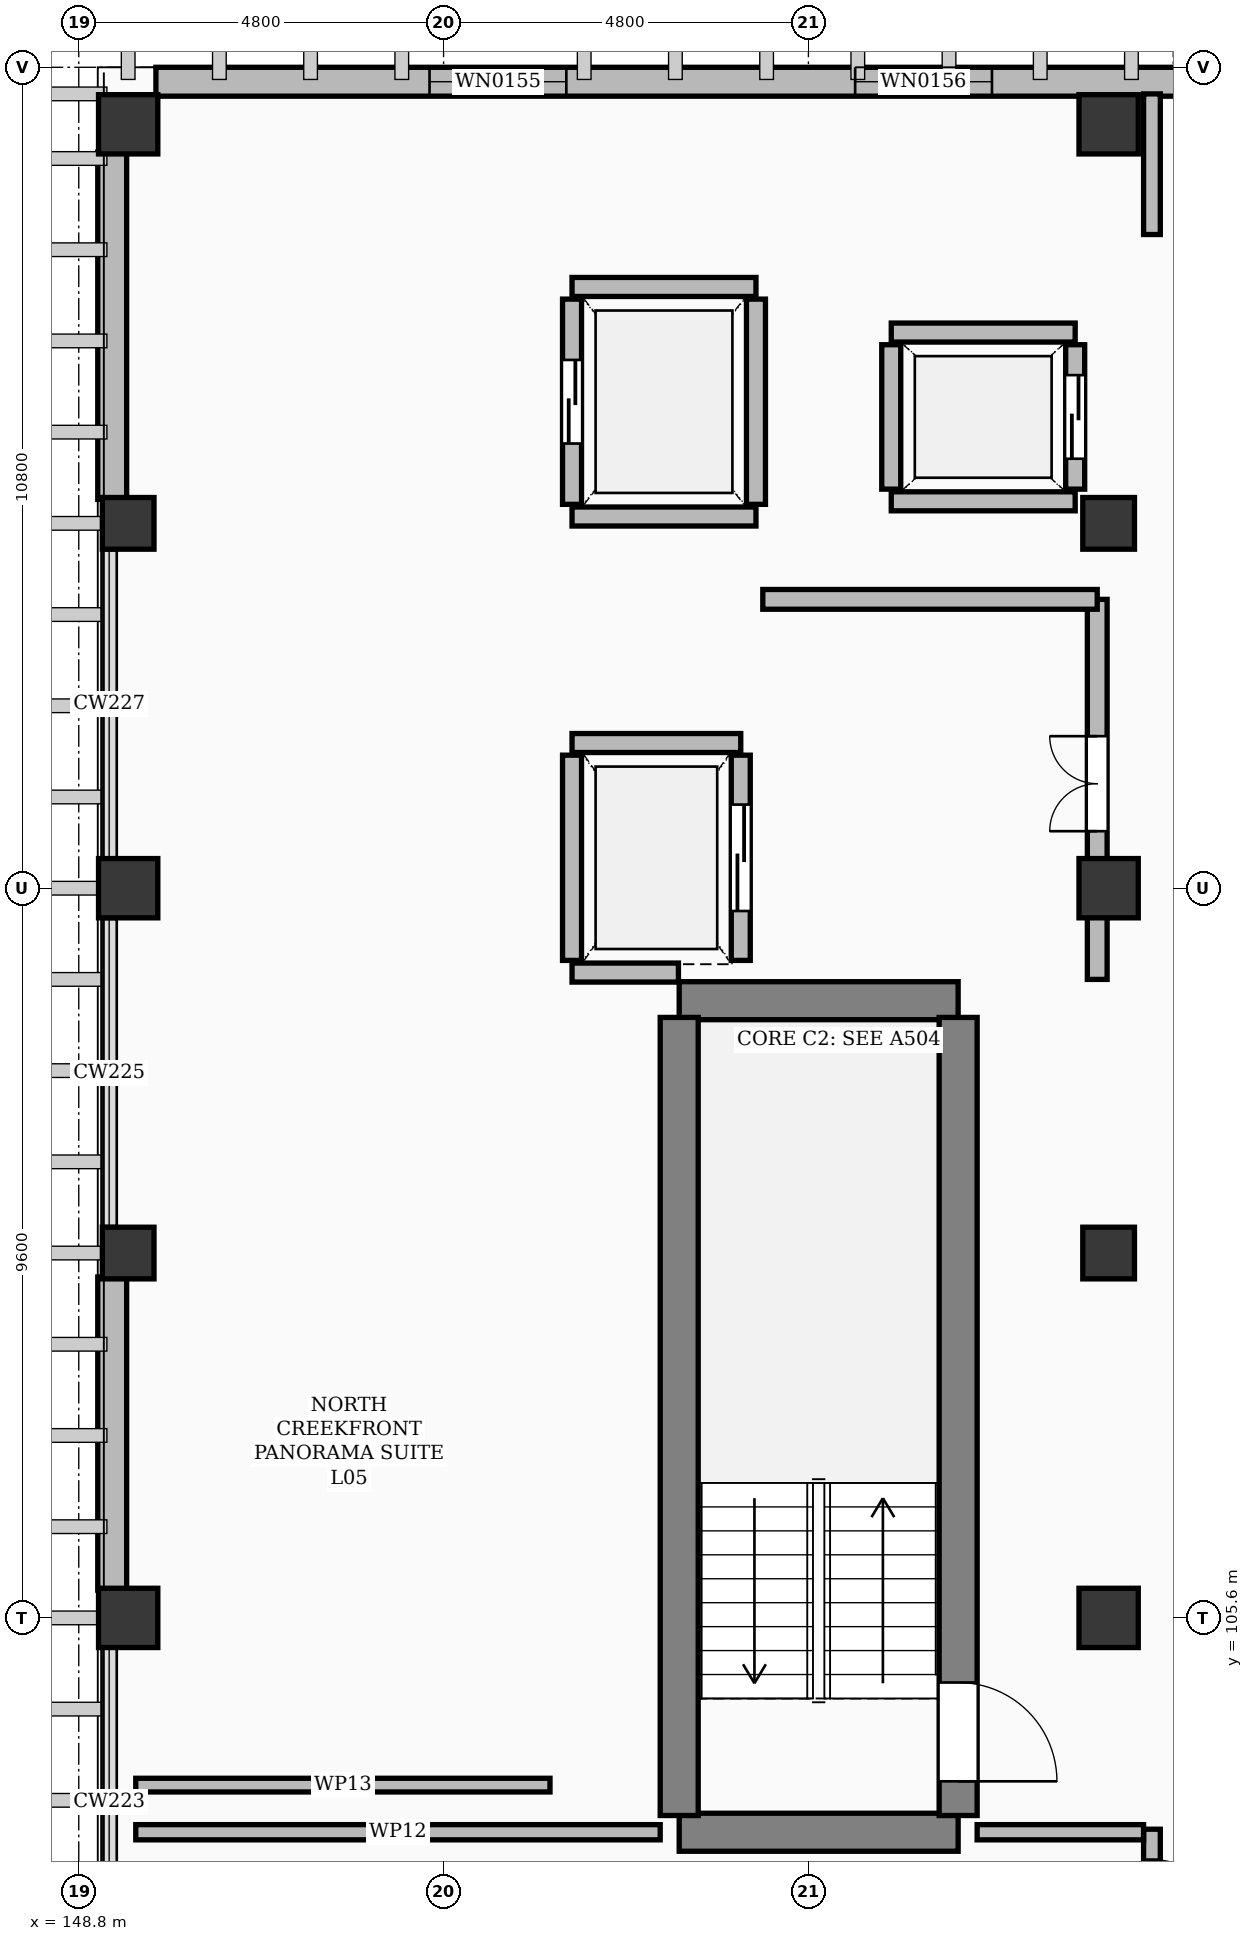
"""IFC4 building model, lengths in metres.
Left out: names, types, materials, properties, quantities, classifications, styles, units other than length and angle.
Written with IfcOpenShell. Run it as: python <this file> out.ifc"""

import sys

from ifc_helpers import new_model, si_unit, direction, frame, frame_2d, origin, origin_2d, place, context, subcontext, project, spatial, rectangle, extrude, element, fill, save


model = new_model("IFC4")
c1 = context("Model", 3, precision=1e-05, world=origin(), true_north=direction((0.0, 1.0)))
c2 = subcontext(c1, "Body", "Model", "MODEL_VIEW")
j1 = project(units=[si_unit("LENGTHUNIT", "METRE"), si_unit("PLANEANGLEUNIT", "RADIAN")], contexts=[c1])
p1 = place(None, origin())
s1 = spatial("IfcSite", under=j1, at=p1, CompositionType="ELEMENT")
p2 = place(p1, origin())
s2 = spatial("IfcBuilding", under=s1, at=p2, CompositionType="ELEMENT")
p3 = place(p2, frame((0.0, 0.0, 24.6)))
s3 = spatial("IfcBuildingStorey", under=s2, at=p3, CompositionType="ELEMENT", Elevation=24.6)
for number, where, z_axis, x_axis in (
    (1, (149.45, 105.6, 0.0), (0.0, 0.0, 1.0), (1.0, 0.0, 0.0)),
    (2, (149.45, 115.2, 0.0), (0.0, 0.0, 1.0), (1.0, 0.0, 0.0)),
    (3, (149.45, 125.25, 0.0), (0.0, 0.0, 1.0), (1.0, 0.0, 0.0)),
    (4, (162.35, 105.6, 0.0), (0.0, 0.0, 1.0), (1.0, 0.0, 0.0)),
    (5, (162.35, 115.2, 0.0), (0.0, 0.0, 1.0), (1.0, 0.0, 0.0)),
    (6, (162.35, 125.25, 0.0), (0.0, 0.0, 1.0), (1.0, 0.0, 0.0)),
):
    element("IfcColumn", number, at=place(p3, frame(where, z_axis=z_axis, x_axis=x_axis)), inside=s3, PredefinedType="COLUMN", context=c2, shape_type="SweptSolid", body=[
        extrude(rectangle(XDim=0.78, YDim=0.78, at=origin_2d()), origin(), (0.0, 0.0, 1.0), 3.6),
    ])
for number, where, z_axis, x_axis in (
    (7, (149.45, 110.4, 0.0), (0.0, 0.0, 1.0), (1.0, 0.0, 0.0)),
    (8, (149.45, 120.0, 0.0), (0.0, 0.0, 1.0), (1.0, 0.0, 0.0)),
    (9, (162.35, 110.4, 0.0), (0.0, 0.0, 1.0), (1.0, 0.0, 0.0)),
    (10, (162.35, 120.0, 0.0), (0.0, 0.0, 1.0), (1.0, 0.0, 0.0)),
):
    element("IfcColumn", number, at=place(p3, frame(where, z_axis=z_axis, x_axis=x_axis)), inside=s3, PredefinedType="COLUMN", context=c2, shape_type="SweptSolid", body=[
        extrude(rectangle(XDim=0.68, YDim=0.68, at=origin_2d()), origin(), (0.0, 0.0, 1.0), 3.6),
    ])
p4 = place(p3, frame((149.815, 125.81, 0.0), z_axis=(0.0, 0.0, 1.0), x_axis=(1.0, 0.0, 0.0)))
e11 = element("IfcWall", 11, at=p4, inside=s3, PredefinedType="SOLIDWALL", context=c2, shape_type="SweptSolid", body=[
    extrude(rectangle(XDim=29.17, YDim=0.38, at=frame_2d((14.585, 0.0))), origin(), (0.0, 0.0, 1.0), 3.34),
])
p5 = place(p4, frame((3.6, 0.0, 0.55)))
e12 = element("IfcOpeningElement", 12, at=p5, cuts=e11, PredefinedType="OPENING", context=c2, shape_type="SweptSolid", body=[
    extrude(rectangle(XDim=1.8, YDim=1.76, at=frame_2d((0.9, 0.88))), frame((0.0, 0.202, 0.0), z_axis=(0.0, -1.0, 0.0), x_axis=(1.0, 0.0, 0.0)), (0.0, 0.0, 1.0), 0.404),
])
p6 = place(p4, frame((9.2, 0.0, 0.55)))
e13 = element("IfcOpeningElement", 13, at=p6, cuts=e11, PredefinedType="OPENING", context=c2, shape_type="SweptSolid", body=[
    extrude(rectangle(XDim=1.8, YDim=1.76, at=frame_2d((0.9, 0.88))), frame((0.0, 0.202, 0.0), z_axis=(0.0, -1.0, 0.0), x_axis=(1.0, 0.0, 0.0)), (0.0, 0.0, 1.0), 0.404),
])
p7 = place(p4, frame((19.6, 0.0, 0.55)))
e14 = element("IfcOpeningElement", 14, at=p7, cuts=e11, PredefinedType="OPENING", context=c2, shape_type="SweptSolid", body=[
    extrude(rectangle(XDim=1.8, YDim=1.76, at=frame_2d((0.9, 0.88))), frame((0.0, 0.202, 0.0), z_axis=(0.0, -1.0, 0.0), x_axis=(1.0, 0.0, 0.0)), (0.0, 0.0, 1.0), 0.404),
])
p8 = place(p4, frame((25.2, 0.0, 0.55)))
e15 = element("IfcOpeningElement", 15, at=p8, cuts=e11, PredefinedType="OPENING", context=c2, shape_type="SweptSolid", body=[
    extrude(rectangle(XDim=1.8, YDim=1.76, at=frame_2d((0.9, 0.88))), frame((0.0, 0.202, 0.0), z_axis=(0.0, -1.0, 0.0), x_axis=(1.0, 0.0, 0.0)), (0.0, 0.0, 1.0), 0.404),
])
p9 = place(p3, frame((149.24, 105.965, 0.0), z_axis=(0.0, 0.0, 1.0), x_axis=(0.0, 1.0, 0.0)))
e16 = element("IfcWall", 16, at=p9, inside=s3, PredefinedType="SOLIDWALL", context=c2, shape_type="SweptSolid", body=[
    extrude(rectangle(XDim=4.12, YDim=0.38, at=frame_2d((2.06, 0.0))), origin(), (0.0, 0.0, 1.0), 2.632),
])
p10 = place(p3, frame((149.24, 120.315, 0.0), z_axis=(0.0, 0.0, 1.0), x_axis=(0.0, 1.0, 0.0)))
e17 = element("IfcWall", 17, at=p10, inside=s3, PredefinedType="SOLIDWALL", context=c2, shape_type="SweptSolid", body=[
    extrude(rectangle(XDim=4.57, YDim=0.38, at=frame_2d((2.285, 0.0))), origin(), (0.0, 0.0, 1.0), 2.632),
])
for number, where, z_axis, x_axis in (
    (18, (156.7, 102.78, 0.0), (0.0, 0.0, 1.0), (1.0, 0.0, 0.0)),
    (19, (156.7, 113.72, 0.0), (0.0, 0.0, 1.0), (1.0, 0.0, 0.0)),
):
    element("IfcWall", number, at=place(p3, frame(where, z_axis=z_axis, x_axis=x_axis)), inside=s3, PredefinedType="SHEAR", context=c2, shape_type="SweptSolid", body=[
        extrude(rectangle(XDim=3.67, YDim=0.5, at=frame_2d((1.835, 0.0))), origin(), (0.0, 0.0, 1.0), 3.34),
    ])
p11 = place(p3, frame((156.7, 103.0, 0.0), z_axis=(0.0, 0.0, 1.0), x_axis=(0.0, 1.0, 0.0)))
e20 = element("IfcWall", 20, at=p11, inside=s3, PredefinedType="SHEAR", context=c2, shape_type="SweptSolid", body=[
    extrude(rectangle(XDim=10.5, YDim=0.5, at=frame_2d((5.25, 0.0))), origin(), (0.0, 0.0, 1.0), 3.34),
])
p12 = place(p3, frame((160.37, 103.0, 0.0), z_axis=(0.0, 0.0, 1.0), x_axis=(0.0, 1.0, 0.0)))
e21 = element("IfcWall", 21, at=p12, inside=s3, PredefinedType="SHEAR", context=c2, shape_type="SweptSolid", body=[
    extrude(rectangle(XDim=10.5, YDim=0.5, at=frame_2d((5.25, 0.0))), origin(), (0.0, 0.0, 1.0), 3.34),
])
p13 = place(p12, frame((0.45, 0.0, 0.0)))
e22 = element("IfcOpeningElement", 22, at=p13, cuts=e21, PredefinedType="OPENING", context=c2, shape_type="SweptSolid", body=[
    extrude(rectangle(XDim=1.3, YDim=2.15, at=frame_2d((0.65, 1.075))), frame((0.0, 0.262, 0.0), z_axis=(0.0, -1.0, 0.0), x_axis=(1.0, 0.0, 0.0)), (0.0, 0.0, 1.0), 0.524),
])
p14 = place(p3, frame((155.29, 114.09, 0.0), z_axis=(0.0, 0.0, 1.0), x_axis=(1.0, 0.0, 0.0)))
e23 = element("IfcWall", 23, at=p14, inside=s3, PredefinedType="SOLIDWALL", context=c2, shape_type="SweptSolid", body=[
    extrude(rectangle(XDim=1.4, YDim=0.25, at=frame_2d((0.7, 0.0))), origin(), (0.0, 0.0, 1.0), 3.34),
])
p15 = place(p3, frame((155.29, 117.11, 0.0), z_axis=(0.0, 0.0, 1.0), x_axis=(1.0, 0.0, 0.0)))
e24 = element("IfcWall", 24, at=p15, inside=s3, PredefinedType="SOLIDWALL", context=c2, shape_type="SweptSolid", body=[
    extrude(rectangle(XDim=2.22, YDim=0.25, at=frame_2d((1.11, 0.0))), origin(), (0.0, 0.0, 1.0), 3.34),
])
p16 = place(p3, frame((155.29, 114.25, 0.0), z_axis=(0.0, 0.0, 1.0), x_axis=(0.0, 1.0, 0.0)))
e25 = element("IfcWall", 25, at=p16, inside=s3, PredefinedType="SOLIDWALL", context=c2, shape_type="SweptSolid", body=[
    extrude(rectangle(XDim=2.7, YDim=0.25, at=frame_2d((1.35, 0.0))), origin(), (0.0, 0.0, 1.0), 2.632),
])
p17 = place(p3, frame((157.51, 114.25, 0.0), z_axis=(0.0, 0.0, 1.0), x_axis=(0.0, 1.0, 0.0)))
e26 = element("IfcWall", 26, at=p17, inside=s3, PredefinedType="SOLIDWALL", context=c2, shape_type="SweptSolid", body=[
    extrude(rectangle(XDim=2.7, YDim=0.25, at=frame_2d((1.35, 0.0))), origin(), (0.0, 0.0, 1.0), 2.632),
])
p18 = place(p17, frame((0.65, 0.0, 0.0)))
e27 = element("IfcOpeningElement", 27, at=p18, cuts=e26, PredefinedType="OPENING", context=c2, shape_type="SweptSolid", body=[
    extrude(rectangle(XDim=1.4, YDim=2.3, at=frame_2d((0.7, 1.15))), frame((0.0, 0.137, 0.0), z_axis=(0.0, -1.0, 0.0), x_axis=(1.0, 0.0, 0.0)), (0.0, 0.0, 1.0), 0.274),
])
p19 = place(p3, frame((159.49, 120.29, 0.0), z_axis=(0.0, 0.0, 1.0), x_axis=(1.0, 0.0, 0.0)))
e28 = element("IfcWall", 28, at=p19, inside=s3, PredefinedType="SOLIDWALL", context=c2, shape_type="SweptSolid", body=[
    extrude(rectangle(XDim=2.42, YDim=0.25, at=frame_2d((1.21, 0.0))), origin(), (0.0, 0.0, 1.0), 2.632),
])
p20 = place(p3, frame((159.49, 122.51, 0.0), z_axis=(0.0, 0.0, 1.0), x_axis=(1.0, 0.0, 0.0)))
e29 = element("IfcWall", 29, at=p20, inside=s3, PredefinedType="SOLIDWALL", context=c2, shape_type="SweptSolid", body=[
    extrude(rectangle(XDim=2.42, YDim=0.25, at=frame_2d((1.21, 0.0))), origin(), (0.0, 0.0, 1.0), 3.34),
])
p21 = place(p3, frame((159.49, 120.45, 0.0), z_axis=(0.0, 0.0, 1.0), x_axis=(0.0, 1.0, 0.0)))
e30 = element("IfcWall", 30, at=p21, inside=s3, PredefinedType="SOLIDWALL", context=c2, shape_type="SweptSolid", body=[
    extrude(rectangle(XDim=1.9, YDim=0.25, at=frame_2d((0.95, 0.0))), origin(), (0.0, 0.0, 1.0), 3.34),
])
p22 = place(p3, frame((161.91, 120.45, 0.0), z_axis=(0.0, 0.0, 1.0), x_axis=(0.0, 1.0, 0.0)))
e31 = element("IfcWall", 31, at=p22, inside=s3, PredefinedType="SOLIDWALL", context=c2, shape_type="SweptSolid", body=[
    extrude(rectangle(XDim=1.9, YDim=0.25, at=frame_2d((0.95, 0.0))), origin(), (0.0, 0.0, 1.0), 3.34),
])
p23 = place(p22, frame((0.4, 0.0, 0.0)))
e32 = element("IfcOpeningElement", 32, at=p23, cuts=e31, PredefinedType="OPENING", context=c2, shape_type="SweptSolid", body=[
    extrude(rectangle(XDim=1.1, YDim=2.2, at=frame_2d((0.55, 1.1))), frame((0.0, 0.137, 0.0), z_axis=(0.0, -1.0, 0.0), x_axis=(1.0, 0.0, 0.0)), (0.0, 0.0, 1.0), 0.274),
])
p24 = place(p3, frame((155.29, 120.09, 0.0), z_axis=(0.0, 0.0, 1.0), x_axis=(1.0, 0.0, 0.0)))
e33 = element("IfcWall", 33, at=p24, inside=s3, PredefinedType="SOLIDWALL", context=c2, shape_type="SweptSolid", body=[
    extrude(rectangle(XDim=2.42, YDim=0.25, at=frame_2d((1.21, 0.0))), origin(), (0.0, 0.0, 1.0), 2.632),
])
p25 = place(p3, frame((155.29, 123.11, 0.0), z_axis=(0.0, 0.0, 1.0), x_axis=(1.0, 0.0, 0.0)))
e34 = element("IfcWall", 34, at=p25, inside=s3, PredefinedType="SOLIDWALL", context=c2, shape_type="SweptSolid", body=[
    extrude(rectangle(XDim=2.42, YDim=0.25, at=frame_2d((1.21, 0.0))), origin(), (0.0, 0.0, 1.0), 3.34),
])
p26 = place(p3, frame((155.29, 120.25, 0.0), z_axis=(0.0, 0.0, 1.0), x_axis=(0.0, 1.0, 0.0)))
e35 = element("IfcWall", 35, at=p26, inside=s3, PredefinedType="SOLIDWALL", context=c2, shape_type="SweptSolid", body=[
    extrude(rectangle(XDim=2.7, YDim=0.25, at=frame_2d((1.35, 0.0))), origin(), (0.0, 0.0, 1.0), 2.632),
])
p27 = place(p26, frame((0.8, 0.0, 0.0)))
e36 = element("IfcOpeningElement", 36, at=p27, cuts=e35, PredefinedType="OPENING", context=c2, shape_type="SweptSolid", body=[
    extrude(rectangle(XDim=1.1, YDim=2.2, at=frame_2d((0.55, 1.1))), frame((0.0, 0.137, 0.0), z_axis=(0.0, -1.0, 0.0), x_axis=(1.0, 0.0, 0.0)), (0.0, 0.0, 1.0), 0.274),
])
p28 = place(p3, frame((157.71, 120.25, 0.0), z_axis=(0.0, 0.0, 1.0), x_axis=(0.0, 1.0, 0.0)))
e37 = element("IfcWall", 37, at=p28, inside=s3, PredefinedType="SOLIDWALL", context=c2, shape_type="SweptSolid", body=[
    extrude(rectangle(XDim=2.7, YDim=0.25, at=frame_2d((1.35, 0.0))), origin(), (0.0, 0.0, 1.0), 2.632),
])
p29 = place(p3, frame((162.2, 114.0, 0.0), z_axis=(0.0, 0.0, 1.0), x_axis=(0.0, 1.0, 0.0)))
e38 = element("IfcWall", 38, at=p29, inside=s3, PredefinedType="SOLIDWALL", context=c2, shape_type="SweptSolid", body=[
    extrude(rectangle(XDim=5.0, YDim=0.26, at=frame_2d((2.5, 0.0))), origin(), (0.0, 0.0, 1.0), 2.632),
])
p30 = place(p29, frame((1.95, 0.0, 0.0)))
e39 = element("IfcOpeningElement", 39, at=p30, cuts=e38, PredefinedType="OPENING", context=c2, shape_type="SweptSolid", body=[
    extrude(rectangle(XDim=1.25, YDim=2.15, at=frame_2d((0.625, 1.075))), frame((0.0, 0.142, 0.0), z_axis=(0.0, -1.0, 0.0), x_axis=(1.0, 0.0, 0.0)), (0.0, 0.0, 1.0), 0.284),
])
p31 = place(p3, frame((157.8, 119.0, 0.0), z_axis=(0.0, 0.0, 1.0), x_axis=(1.0, 0.0, 0.0)))
e40 = element("IfcWall", 40, at=p31, inside=s3, PredefinedType="SOLIDWALL", context=c2, shape_type="SweptSolid", body=[
    extrude(rectangle(XDim=4.4, YDim=0.26, at=frame_2d((2.2, 0.0))), origin(), (0.0, 0.0, 1.0), 2.632),
])
p32 = place(p3, frame((162.92, 95.6, 0.0), z_axis=(0.0, 0.0, 1.0), x_axis=(0.0, 1.0, 0.0)))
e41 = element("IfcWall", 41, at=p32, inside=s3, PredefinedType="PARTITIONING", context=c2, shape_type="SweptSolid", body=[
    extrude(rectangle(XDim=7.22, YDim=0.22, at=frame_2d((3.61, 0.0))), origin(), (0.0, 0.0, 1.0), 2.632),
])
p33 = place(p32, frame((2.05, 0.0, 0.0)))
e42 = element("IfcOpeningElement", 42, at=p33, cuts=e41, PredefinedType="OPENING", context=c2, shape_type="SweptSolid", body=[
    extrude(rectangle(XDim=1.12, YDim=2.15, at=frame_2d((0.56, 1.075))), frame((0.0, 0.122, 0.0), z_axis=(0.0, -1.0, 0.0), x_axis=(1.0, 0.0, 0.0)), (0.0, 0.0, 1.0), 0.244),
])
p34 = place(p32, frame((5.8, 0.0, 0.0)))
e43 = element("IfcOpeningElement", 43, at=p34, cuts=e41, PredefinedType="OPENING", context=c2, shape_type="SweptSolid", body=[
    extrude(rectangle(XDim=1.02, YDim=2.2, at=frame_2d((0.51, 1.1))), frame((0.0, 0.122, 0.0), z_axis=(0.0, -1.0, 0.0), x_axis=(1.0, 0.0, 0.0)), (0.0, 0.0, 1.0), 0.244),
])
p35 = place(p3, frame((162.92, 123.8, 0.0), z_axis=(0.0, 0.0, 1.0), x_axis=(0.0, 1.0, 0.0)))
e44 = element("IfcWall", 44, at=p35, inside=s3, PredefinedType="PARTITIONING", context=c2, shape_type="SweptSolid", body=[
    extrude(rectangle(XDim=1.85, YDim=0.22, at=frame_2d((0.925, 0.0))), origin(), (0.0, 0.0, 1.0), 2.582),
])
p36 = place(p3, frame((149.55, 102.78, 0.0), z_axis=(0.0, 0.0, 1.0), x_axis=(1.0, 0.0, 0.0)))
e45 = element("IfcWall", 45, at=p36, inside=s3, PredefinedType="PARTITIONING", context=c2, shape_type="SweptSolid", body=[
    extrude(rectangle(XDim=6.9, YDim=0.2, at=frame_2d((3.45, 0.0))), origin(), (0.0, 0.0, 1.0), 2.632),
])
p37 = place(p3, frame((160.62, 102.78, 0.0), z_axis=(0.0, 0.0, 1.0), x_axis=(1.0, 0.0, 0.0)))
e46 = element("IfcWall", 46, at=p37, inside=s3, PredefinedType="PARTITIONING", context=c2, shape_type="SweptSolid", body=[
    extrude(rectangle(XDim=2.19, YDim=0.2, at=frame_2d((1.095, 0.0))), origin(), (0.0, 0.0, 1.0), 2.632),
])
p38 = place(p3, frame((149.55, 103.4, 0.0), z_axis=(0.0, 0.0, 1.0), x_axis=(1.0, 0.0, 0.0)))
e47 = element("IfcWall", 47, at=p38, inside=s3, PredefinedType="PARTITIONING", context=c2, shape_type="SweptSolid", body=[
    extrude(rectangle(XDim=5.45, YDim=0.18, at=frame_2d((2.725, 0.0))), origin(), (0.0, 0.0, 1.0), 2.632),
])
p39 = place(p5, origin())
e48 = element("IfcWindow", 48, at=p39, inside=s3, PartitioningType="SINGLE_PANEL", PredefinedType="WINDOW", context=c2, shape_type="SweptSolid", body=[
    extrude(rectangle(XDim=1.8, YDim=1.76, at=frame_2d((0.9, 0.88))), frame((0.0, 0.03, 0.0), z_axis=(0.0, -1.0, 0.0), x_axis=(1.0, 0.0, 0.0)), (0.0, 0.0, 1.0), 0.06),
])
fill(e12, e48)
p40 = place(p6, origin())
e49 = element("IfcWindow", 49, at=p40, inside=s3, PartitioningType="SINGLE_PANEL", PredefinedType="WINDOW", context=c2, shape_type="SweptSolid", body=[
    extrude(rectangle(XDim=1.8, YDim=1.76, at=frame_2d((0.9, 0.88))), frame((0.0, 0.03, 0.0), z_axis=(0.0, -1.0, 0.0), x_axis=(1.0, 0.0, 0.0)), (0.0, 0.0, 1.0), 0.06),
])
fill(e13, e49)
p41 = place(p13, frame((1.3, 0.0, 0.0), z_axis=(0.0, 0.0, 1.0), x_axis=(-1.0, 0.0, 0.0)))
e50 = element("IfcDoor", 50, at=p41, inside=s3, OperationType="SINGLE_SWING_LEFT", PredefinedType="DOOR", context=c2, shape_type="SweptSolid", body=[
    extrude(rectangle(XDim=1.3, YDim=2.15, at=frame_2d((0.65, 1.075))), frame((0.0, 0.025, 0.0), z_axis=(0.0, -1.0, 0.0), x_axis=(1.0, 0.0, 0.0)), (0.0, 0.0, 1.0), 0.05),
])
fill(e22, e50)
p42 = place(p18, origin())
e51 = element("IfcDoor", 51, at=p42, inside=s3, OperationType="SLIDING_TO_LEFT", PredefinedType="DOOR", context=c2, shape_type="SweptSolid", body=[
    extrude(rectangle(XDim=1.4, YDim=2.3, at=frame_2d((0.7, 1.15))), frame((0.0, 0.025, 0.0), z_axis=(0.0, -1.0, 0.0), x_axis=(1.0, 0.0, 0.0)), (0.0, 0.0, 1.0), 0.05),
])
fill(e27, e51)
p43 = place(p23, origin())
e52 = element("IfcDoor", 52, at=p43, inside=s3, OperationType="SLIDING_TO_LEFT", PredefinedType="DOOR", context=c2, shape_type="SweptSolid", body=[
    extrude(rectangle(XDim=1.1, YDim=2.2, at=frame_2d((0.55, 1.1))), frame((0.0, 0.025, 0.0), z_axis=(0.0, -1.0, 0.0), x_axis=(1.0, 0.0, 0.0)), (0.0, 0.0, 1.0), 0.05),
])
fill(e32, e52)
p44 = place(p27, origin())
e53 = element("IfcDoor", 53, at=p44, inside=s3, OperationType="SLIDING_TO_LEFT", PredefinedType="DOOR", context=c2, shape_type="SweptSolid", body=[
    extrude(rectangle(XDim=1.1, YDim=2.2, at=frame_2d((0.55, 1.1))), frame((0.0, 0.025, 0.0), z_axis=(0.0, -1.0, 0.0), x_axis=(1.0, 0.0, 0.0)), (0.0, 0.0, 1.0), 0.05),
])
fill(e36, e53)
p45 = place(p30, origin())
e54 = element("IfcDoor", 54, at=p45, inside=s3, OperationType="DOUBLE_DOOR_SINGLE_SWING", PredefinedType="DOOR", context=c2, shape_type="SweptSolid", body=[
    extrude(rectangle(XDim=1.25, YDim=2.15, at=frame_2d((0.625, 1.075))), frame((0.0, 0.025, 0.0), z_axis=(0.0, -1.0, 0.0), x_axis=(1.0, 0.0, 0.0)), (0.0, 0.0, 1.0), 0.05),
])
fill(e39, e54)
p46 = place(p34, frame((1.02, 0.0, 0.0), z_axis=(0.0, 0.0, 1.0), x_axis=(-1.0, 0.0, 0.0)))
e55 = element("IfcDoor", 55, at=p46, inside=s3, OperationType="SINGLE_SWING_LEFT", PredefinedType="DOOR", context=c2, shape_type="SweptSolid", body=[
    extrude(rectangle(XDim=1.02, YDim=2.2, at=frame_2d((0.51, 1.1))), frame((0.0, 0.025, 0.0), z_axis=(0.0, -1.0, 0.0), x_axis=(1.0, 0.0, 0.0)), (0.0, 0.0, 1.0), 0.05),
])
fill(e43, e55)
save(model, sys.argv[1])
